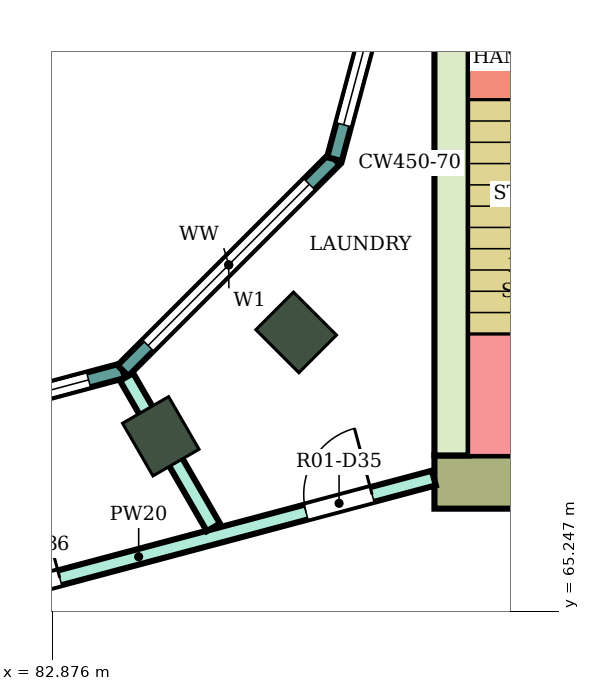
"""IFC4 building model, lengths in metres.
Left out: names, types, materials, properties, quantities, classifications, styles, units other than length and angle.
Written with IfcOpenShell. Run it as: python <this file> out.ifc"""

import sys

from ifc_helpers import new_model, si_unit, direction, frame, frame_2d, origin, origin_2d, place, context, subcontext, project, spatial, rectangle, extrude, element, fill, save


model = new_model("IFC4")
c1 = context("Model", 3, precision=1e-05, world=origin(), true_north=direction((0.0, 1.0)))
c2 = subcontext(c1, "Body", "Model", "MODEL_VIEW")
j1 = project(units=[si_unit("LENGTHUNIT", "METRE"), si_unit("PLANEANGLEUNIT", "RADIAN")], contexts=[c1])
p1 = place(None, origin())
s1 = spatial("IfcSite", under=j1, at=p1, CompositionType="ELEMENT")
p2 = place(p1, origin())
s2 = spatial("IfcBuilding", under=s1, at=p2, CompositionType="ELEMENT")
p3 = place(p2, frame((0.0, 0.0, 161.8)))
s3 = spatial("IfcBuildingStorey", under=s2, at=p3, CompositionType="ELEMENT", Elevation=161.8)
for number, where, z_axis, x_axis in (
    (1, (84.3, 67.552, 0.0), (0.0, 0.0, 1.0), (0.5, -0.866, 0.0)),
    (2, (86.081, 68.919, 0.0), (0.0, 0.0, 1.0), (0.707, -0.707, 0.0)),
):
    element("IfcColumn", number, at=place(p3, frame(where, z_axis=z_axis, x_axis=x_axis)), inside=s3, PredefinedType="COLUMN", context=c2, shape_type="SweptSolid", body=[
        extrude(rectangle(XDim=0.8, YDim=0.7, at=origin_2d()), origin(), (0.0, 0.0, 1.0), 4.1),
    ])
p4 = place(p3, frame((87.9, 66.95, 0.0), z_axis=(0.0, 0.0, 1.0), x_axis=(1.0, 0.0, 0.0)))
e3 = element("IfcWall", 3, at=p4, inside=s3, PredefinedType="SHEAR", context=c2, shape_type="SweptSolid", body=[
    extrude(rectangle(XDim=14.8, YDim=0.7, at=frame_2d((7.4, 0.0))), origin(), (0.0, 0.0, 1.0), 3.78),
])
p5 = place(p4, frame((4.2, 0.0, 0.0)))
e4 = element("IfcOpeningElement", 4, at=p5, cuts=e3, PredefinedType="OPENING", context=c2, shape_type="SweptSolid", body=[
    extrude(rectangle(XDim=2.4, YDim=2.4, at=frame_2d((1.2, 1.2))), frame((0.0, 0.36, 0.0), z_axis=(0.0, -1.0, 0.0), x_axis=(1.0, 0.0, 0.0)), (0.0, 0.0, 1.0), 0.72),
])
p6 = place(p3, frame((88.125, 67.3, 0.0), z_axis=(0.0, 0.0, 1.0), x_axis=(0.0, 1.0, 0.0)))
e5 = element("IfcWall", 5, at=p6, inside=s3, PredefinedType="SHEAR", context=c2, shape_type="SweptSolid", body=[
    extrude(rectangle(XDim=7.7, YDim=0.45, at=frame_2d((3.85, 0.0))), origin(), (0.0, 0.0, 1.0), 3.78),
])
p7 = place(p3, frame((80.0, 67.396, 0.0), z_axis=(0.0, 0.0, 1.0), x_axis=(0.965933654434, 0.258789828301, 0.0)))
e6 = element("IfcWall", 6, at=p7, inside=s3, PredefinedType="NOTDEFINED", context=c2, shape_type="SweptSolid", body=[
    extrude(rectangle(XDim=3.936, YDim=0.2, at=frame_2d((1.968, 0.0))), origin(), (0.0, 0.0, 1.0), 4.1),
])
p8 = place(p7, frame((0.468, 0.0, 0.9)))
e7 = element("IfcOpeningElement", 7, at=p8, cuts=e6, PredefinedType="OPENING", context=c2, shape_type="SweptSolid", body=[
    extrude(rectangle(XDim=3.0, YDim=2.3, at=frame_2d((1.5, 1.15))), frame((0.0, 0.11, 0.0), z_axis=(0.0, -1.0, 0.0), x_axis=(1.0, 0.0, 0.0)), (0.0, 0.0, 1.0), 0.22),
])
p9 = place(p3, frame((83.802, 68.415, 0.0), z_axis=(0.0, 0.0, 1.0), x_axis=(0.707106781187, 0.707106781187, 0.0)))
e8 = element("IfcWall", 8, at=p9, inside=s3, PredefinedType="NOTDEFINED", context=c2, shape_type="SweptSolid", body=[
    extrude(rectangle(XDim=3.936, YDim=0.2, at=frame_2d((1.968, 0.0))), origin(), (0.0, 0.0, 1.0), 4.1),
])
p10 = place(p9, frame((0.468, 0.0, 0.9)))
e9 = element("IfcOpeningElement", 9, at=p10, cuts=e8, PredefinedType="OPENING", context=c2, shape_type="SweptSolid", body=[
    extrude(rectangle(XDim=3.0, YDim=2.3, at=frame_2d((1.5, 1.15))), frame((0.0, 0.11, 0.0), z_axis=(0.0, -1.0, 0.0), x_axis=(1.0, 0.0, 0.0)), (0.0, 0.0, 1.0), 0.22),
])
p11 = place(p3, frame((86.585, 71.198, 0.0), z_axis=(0.0, 0.0, 1.0), x_axis=(0.258789828301, 0.965933654434, 0.0)))
e10 = element("IfcWall", 10, at=p11, inside=s3, PredefinedType="NOTDEFINED", context=c2, shape_type="SweptSolid", body=[
    extrude(rectangle(XDim=3.936, YDim=0.2, at=frame_2d((1.968, 0.0))), origin(), (0.0, 0.0, 1.0), 4.1),
])
p12 = place(p11, frame((0.468, 0.0, 0.9)))
e11 = element("IfcOpeningElement", 11, at=p12, cuts=e10, PredefinedType="OPENING", context=c2, shape_type="SweptSolid", body=[
    extrude(rectangle(XDim=3.0, YDim=2.3, at=frame_2d((1.5, 1.15))), frame((0.0, 0.11, 0.0), z_axis=(0.0, -1.0, 0.0), x_axis=(1.0, 0.0, 0.0)), (0.0, 0.0, 1.0), 0.22),
])
p13 = place(p3, frame((80.125, 64.932, 0.0), z_axis=(0.0, 0.0, 1.0), x_axis=(0.966236955806, 0.257655089674, 0.0)))
e12 = element("IfcWall", 12, at=p13, inside=s3, PredefinedType="PARTITIONING", context=c2, shape_type="SweptSolid", body=[
    extrude(rectangle(XDim=8.039, YDim=0.2, at=frame_2d((4.02, 0.0))), origin(), (0.0, 0.0, 1.0), 3.65),
])
p14 = place(p13, frame((6.298, 0.0, 0.0)))
e13 = element("IfcOpeningElement", 13, at=p14, cuts=e12, PredefinedType="OPENING", context=c2, shape_type="SweptSolid", body=[
    extrude(rectangle(XDim=0.9, YDim=2.1, at=frame_2d((0.45, 1.05))), frame((0.0, 0.11, 0.0), z_axis=(0.0, -1.0, 0.0), x_axis=(1.0, 0.0, 0.0)), (0.0, 0.0, 1.0), 0.22),
])
p15 = place(p13, frame((2.045, 0.0, 0.0)))
e14 = element("IfcOpeningElement", 14, at=p15, cuts=e12, PredefinedType="OPENING", context=c2, shape_type="SweptSolid", body=[
    extrude(rectangle(XDim=0.9, YDim=2.1, at=frame_2d((0.45, 1.05))), frame((0.0, 0.11, 0.0), z_axis=(0.0, -1.0, 0.0), x_axis=(1.0, 0.0, 0.0)), (0.0, 0.0, 1.0), 0.22),
])
p16 = place(p3, frame((83.85, 68.333, 0.0), z_axis=(0.0, 0.0, 1.0), x_axis=(0.499953638813, -0.866052168773, 0.0)))
e15 = element("IfcWall", 15, at=p16, inside=s3, PredefinedType="PARTITIONING", context=c2, shape_type="SweptSolid", body=[
    extrude(rectangle(XDim=2.285, YDim=0.2, at=frame_2d((1.143, 0.0))), origin(), (0.0, 0.0, 1.0), 3.65),
])
p17 = place(p3, frame((86.053, 63.826, 0.0), z_axis=(0.0, 0.0, 1.0), x_axis=(0.969490004987, 0.245130843083, 0.0)))
e16 = element("IfcWall", 16, at=p17, inside=s3, PredefinedType="PARTITIONING", context=c2, shape_type="SweptSolid", body=[
    extrude(rectangle(XDim=5.908, YDim=0.2, at=frame_2d((2.954, 0.0))), origin(), (0.0, 0.0, 1.0), 3.65),
])
p18 = place(p8, origin())
e17 = element("IfcWindow", 17, at=p18, inside=s3, PartitioningType="SINGLE_PANEL", PredefinedType="WINDOW", context=c2, shape_type="SweptSolid", body=[
    extrude(rectangle(XDim=3.0, YDim=2.3, at=frame_2d((1.5, 1.15))), frame((0.0, 0.03, 0.0), z_axis=(0.0, -1.0, 0.0), x_axis=(1.0, 0.0, 0.0)), (0.0, 0.0, 1.0), 0.06),
])
fill(e7, e17)
p19 = place(p10, origin())
e18 = element("IfcWindow", 18, at=p19, inside=s3, PartitioningType="SINGLE_PANEL", PredefinedType="WINDOW", context=c2, shape_type="SweptSolid", body=[
    extrude(rectangle(XDim=3.0, YDim=2.3, at=frame_2d((1.5, 1.15))), frame((0.0, 0.03, 0.0), z_axis=(0.0, -1.0, 0.0), x_axis=(1.0, 0.0, 0.0)), (0.0, 0.0, 1.0), 0.06),
])
fill(e9, e18)
p20 = place(p12, origin())
e19 = element("IfcWindow", 19, at=p20, inside=s3, PartitioningType="SINGLE_PANEL", PredefinedType="WINDOW", context=c2, shape_type="SweptSolid", body=[
    extrude(rectangle(XDim=3.0, YDim=2.3, at=frame_2d((1.5, 1.15))), frame((0.0, 0.03, 0.0), z_axis=(0.0, -1.0, 0.0), x_axis=(1.0, 0.0, 0.0)), (0.0, 0.0, 1.0), 0.06),
])
fill(e11, e19)
p21 = place(p14, origin())
e20 = element("IfcDoor", 20, at=p21, inside=s3, OperationType="SINGLE_SWING_RIGHT", PredefinedType="DOOR", context=c2, shape_type="SweptSolid", body=[
    extrude(rectangle(XDim=0.9, YDim=2.1, at=frame_2d((0.45, 1.05))), frame((0.0, 0.025, 0.0), z_axis=(0.0, -1.0, 0.0), x_axis=(1.0, 0.0, 0.0)), (0.0, 0.0, 1.0), 0.05),
])
fill(e13, e20)
p22 = place(p15, origin())
e21 = element("IfcDoor", 21, at=p22, inside=s3, OperationType="SINGLE_SWING_RIGHT", PredefinedType="DOOR", context=c2, shape_type="SweptSolid", body=[
    extrude(rectangle(XDim=0.9, YDim=2.1, at=frame_2d((0.45, 1.05))), frame((0.0, 0.025, 0.0), z_axis=(0.0, -1.0, 0.0), x_axis=(1.0, 0.0, 0.0)), (0.0, 0.0, 1.0), 0.05),
])
fill(e14, e21)
save(model, sys.argv[1])
